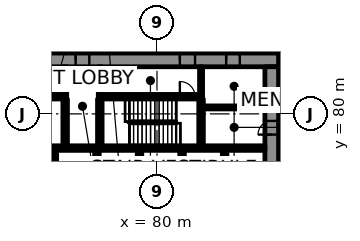
"""IFC4 building model, lengths in metres.
Left out: names, types, materials, properties, quantities, classifications, styles, units other than length and angle.
Written with IfcOpenShell. Run it as: python <this file> out.ifc"""

import sys

from ifc_helpers import new_model, si_unit, direction, frame, frame_2d, origin, place, context, subcontext, project, spatial, rectangle, extrude, element, fill, save


model = new_model("IFC4")
c1 = context("Model", 3, precision=1e-05, world=origin(), true_north=direction((0.0, 1.0)))
c2 = subcontext(c1, "Body", "Model", "MODEL_VIEW")
j1 = project(units=[si_unit("LENGTHUNIT", "METRE"), si_unit("PLANEANGLEUNIT", "RADIAN")], contexts=[c1])
p1 = place(None, origin())
s1 = spatial("IfcSite", under=j1, at=p1, CompositionType="ELEMENT")
p2 = place(p1, origin())
s2 = spatial("IfcBuilding", under=s1, at=p2, CompositionType="ELEMENT")
p3 = place(p2, origin())
s3 = spatial("IfcBuildingStorey", under=s2, at=p3, CompositionType="ELEMENT", Elevation=0.0)
p4 = place(p3, frame((62.0, 83.55, 0.0), z_axis=(0.0, 0.0, 1.0), x_axis=(1.0, 0.0, 0.0)))
e1 = element("IfcWall", 1, at=p4, inside=s3, PredefinedType="SHEAR", context=c2, shape_type="SweptSolid", body=[
    extrude(rectangle(XDim=26.0, YDim=0.9, at=frame_2d((13.0, 0.0))), origin(), (0.0, 0.0, 1.0), 7.7),
])
p5 = place(p4, frame((5.695, 0.0, 0.0)))
e2 = element("IfcOpeningElement", 2, at=p5, cuts=e1, PredefinedType="OPENING", context=c2, shape_type="SweptSolid", body=[
    extrude(rectangle(XDim=1.0, YDim=2.1, at=frame_2d((0.5, 1.05))), frame((0.0, 0.46, 0.0), z_axis=(0.0, -1.0, 0.0), x_axis=(1.0, 0.0, 0.0)), (0.0, 0.0, 1.0), 0.92),
])
p6 = place(p4, frame((19.505, 0.0, 0.0)))
e3 = element("IfcOpeningElement", 3, at=p6, cuts=e1, PredefinedType="OPENING", context=c2, shape_type="SweptSolid", body=[
    extrude(rectangle(XDim=1.0, YDim=2.1, at=frame_2d((0.5, 1.05))), frame((0.0, 0.46, 0.0), z_axis=(0.0, -1.0, 0.0), x_axis=(1.0, 0.0, 0.0)), (0.0, 0.0, 1.0), 0.92),
])
p7 = place(p4, frame((3.45, 0.0, 0.0)))
e4 = element("IfcOpeningElement", 4, at=p7, cuts=e1, PredefinedType="OPENING", context=c2, shape_type="SweptSolid", body=[
    extrude(rectangle(XDim=0.9, YDim=2.1, at=frame_2d((0.45, 1.05))), frame((0.0, 0.46, 0.0), z_axis=(0.0, -1.0, 0.0), x_axis=(1.0, 0.0, 0.0)), (0.0, 0.0, 1.0), 0.92),
])
p8 = place(p4, frame((12.65, 0.0, 0.0)))
e5 = element("IfcOpeningElement", 5, at=p8, cuts=e1, PredefinedType="OPENING", context=c2, shape_type="SweptSolid", body=[
    extrude(rectangle(XDim=0.9, YDim=2.1, at=frame_2d((0.45, 1.05))), frame((0.0, 0.46, 0.0), z_axis=(0.0, -1.0, 0.0), x_axis=(1.0, 0.0, 0.0)), (0.0, 0.0, 1.0), 0.92),
])
p9 = place(p4, frame((22.55, 0.0, 0.0)))
e6 = element("IfcOpeningElement", 6, at=p9, cuts=e1, PredefinedType="OPENING", context=c2, shape_type="SweptSolid", body=[
    extrude(rectangle(XDim=0.9, YDim=2.1, at=frame_2d((0.45, 1.05))), frame((0.0, 0.46, 0.0), z_axis=(0.0, -1.0, 0.0), x_axis=(1.0, 0.0, 0.0)), (0.0, 0.0, 1.0), 0.92),
])
p10 = place(p3, frame((87.55, 66.9, 0.0), z_axis=(0.0, 0.0, 1.0), x_axis=(0.0, 1.0, 0.0)))
e7 = element("IfcWall", 7, at=p10, inside=s3, PredefinedType="SHEAR", context=c2, shape_type="SweptSolid", body=[
    extrude(rectangle(XDim=16.2, YDim=0.9, at=frame_2d((8.1, 0.0))), origin(), (0.0, 0.0, 1.0), 7.7),
])
p11 = place(p10, frame((5.5, 0.0, 0.0)))
e8 = element("IfcOpeningElement", 8, at=p11, cuts=e7, PredefinedType="OPENING", context=c2, shape_type="SweptSolid", body=[
    extrude(rectangle(XDim=1.8, YDim=2.1, at=frame_2d((0.9, 1.05))), frame((0.0, 0.46, 0.0), z_axis=(0.0, -1.0, 0.0), x_axis=(1.0, 0.0, 0.0)), (0.0, 0.0, 1.0), 0.92),
])
p12 = place(p10, frame((11.738, 0.0, 0.0)))
e9 = element("IfcOpeningElement", 9, at=p12, cuts=e7, PredefinedType="OPENING", context=c2, shape_type="SweptSolid", body=[
    extrude(rectangle(XDim=0.9, YDim=2.1, at=frame_2d((0.45, 1.05))), frame((0.0, 0.46, 0.0), z_axis=(0.0, -1.0, 0.0), x_axis=(1.0, 0.0, 0.0)), (0.0, 0.0, 1.0), 0.92),
])
for number, where, z_axis, x_axis in (
    (10, (73.25, 75.0, 0.0), (0.0, 0.0, 1.0), (0.0, 1.0, 0.0)),
    (11, (76.05, 75.0, 0.0), (0.0, 0.0, 1.0), (0.0, 1.0, 0.0)),
    (12, (78.85, 75.0, 0.0), (0.0, 0.0, 1.0), (0.0, 1.0, 0.0)),
    (13, (81.65, 75.0, 0.0), (0.0, 0.0, 1.0), (0.0, 1.0, 0.0)),
    (14, (84.45, 75.0, 0.0), (0.0, 0.0, 1.0), (0.0, 1.0, 0.0)),
):
    element("IfcWall", number, at=place(p3, frame(where, z_axis=z_axis, x_axis=x_axis)), inside=s3, PredefinedType="SHEAR", context=c2, shape_type="SweptSolid", body=[
        extrude(rectangle(XDim=2.6, YDim=0.3, at=frame_2d((1.3, 0.0))), origin(), (0.0, 0.0, 1.0), 7.7),
    ])
p13 = place(p3, frame((64.35, 77.75, 0.0), z_axis=(0.0, 0.0, 1.0), x_axis=(1.0, 0.0, 0.0)))
e15 = element("IfcWall", 15, at=p13, inside=s3, PredefinedType="SHEAR", context=c2, shape_type="SweptSolid", body=[
    extrude(rectangle(XDim=22.75, YDim=0.3, at=frame_2d((11.375, 0.0))), origin(), (0.0, 0.0, 1.0), 7.7),
])
p14 = place(p13, frame((3.345, 0.0, 0.0)))
e16 = element("IfcOpeningElement", 16, at=p14, cuts=e15, PredefinedType="OPENING", context=c2, shape_type="SweptSolid", body=[
    extrude(rectangle(XDim=1.0, YDim=2.1, at=frame_2d((0.5, 1.05))), frame((0.0, 0.16, 0.0), z_axis=(0.0, -1.0, 0.0), x_axis=(1.0, 0.0, 0.0)), (0.0, 0.0, 1.0), 0.32),
])
p15 = place(p3, frame((67.15, 81.13, 0.0), z_axis=(0.0, 0.0, 1.0), x_axis=(1.0, 0.0, 0.0)))
e17 = element("IfcWall", 17, at=p15, inside=s3, PredefinedType="SHEAR", context=c2, shape_type="SweptSolid", body=[
    extrude(rectangle(XDim=6.91, YDim=0.3, at=frame_2d((3.455, 0.0))), origin(), (0.0, 0.0, 1.0), 7.7),
])
p16 = place(p15, frame((0.545, 0.0, 0.0)))
e18 = element("IfcOpeningElement", 18, at=p16, cuts=e17, PredefinedType="OPENING", context=c2, shape_type="SweptSolid", body=[
    extrude(rectangle(XDim=1.0, YDim=2.1, at=frame_2d((0.5, 1.05))), frame((0.0, 0.16, 0.0), z_axis=(0.0, -1.0, 0.0), x_axis=(1.0, 0.0, 0.0)), (0.0, 0.0, 1.0), 0.32),
])
p17 = place(p3, frame((76.14, 81.13, 0.0), z_axis=(0.0, 0.0, 1.0), x_axis=(1.0, 0.0, 0.0)))
e19 = element("IfcWall", 19, at=p17, inside=s3, PredefinedType="SHEAR", context=c2, shape_type="SweptSolid", body=[
    extrude(rectangle(XDim=6.86, YDim=0.3, at=frame_2d((3.43, 0.0))), origin(), (0.0, 0.0, 1.0), 7.7),
])
p18 = place(p17, frame((5.365, 0.0, 0.0)))
e20 = element("IfcOpeningElement", 20, at=p18, cuts=e19, PredefinedType="OPENING", context=c2, shape_type="SweptSolid", body=[
    extrude(rectangle(XDim=1.0, YDim=2.1, at=frame_2d((0.5, 1.05))), frame((0.0, 0.16, 0.0), z_axis=(0.0, -1.0, 0.0), x_axis=(1.0, 0.0, 0.0)), (0.0, 0.0, 1.0), 0.32),
])
for number, where, z_axis, x_axis in (
    (21, (73.96, 77.9, 0.0), (0.0, 0.0, 1.0), (0.0, 1.0, 0.0)),
    (22, (76.24, 77.9, 0.0), (0.0, 0.0, 1.0), (0.0, 1.0, 0.0)),
    (23, (82.9, 77.9, 0.0), (0.0, 0.0, 1.0), (0.0, 1.0, 0.0)),
):
    element("IfcWall", number, at=place(p3, frame(where, z_axis=z_axis, x_axis=x_axis)), inside=s3, PredefinedType="SHEAR", context=c2, shape_type="SweptSolid", body=[
        extrude(rectangle(XDim=3.08, YDim=0.3, at=frame_2d((1.54, 0.0))), origin(), (0.0, 0.0, 1.0), 7.7),
    ])
p19 = place(p3, frame((107.504, 60.451, 0.0), z_axis=(0.0, 0.0, 1.0), x_axis=(-0.500000550228, 0.86602508611, 0.0)))
e24 = element("IfcWall", 24, at=p19, inside=s3, PredefinedType="SOLIDWALL", context=c2, shape_type="SweptSolid", body=[
    extrude(rectangle(XDim=57.704, YDim=0.3, at=frame_2d((28.852, 0.0))), origin(), (0.0, 0.0, 1.0), 7.7),
])
p20 = place(p19, frame((56.104, 0.0, 0.0)))
e25 = element("IfcOpeningElement", 25, at=p20, cuts=e24, PredefinedType="OPENING", context=c2, shape_type="SweptSolid", body=[
    extrude(rectangle(XDim=1.2, YDim=2.4, at=frame_2d((0.6, 1.2))), frame((0.0, 0.16, 0.0), z_axis=(0.0, -1.0, 0.0), x_axis=(1.0, 0.0, 0.0)), (0.0, 0.0, 1.0), 0.32),
])
p21 = place(p19, frame((1.552, 0.0, 0.15)))
e26 = element("IfcOpeningElement", 26, at=p21, cuts=e24, PredefinedType="OPENING", context=c2, shape_type="SweptSolid", body=[
    extrude(rectangle(XDim=2.1, YDim=5.4, at=frame_2d((1.05, 2.7))), frame((0.0, 0.16, 0.0), z_axis=(0.0, -1.0, 0.0), x_axis=(1.0, 0.0, 0.0)), (0.0, 0.0, 1.0), 0.32),
])
p22 = place(p19, frame((4.052, 0.0, 0.15)))
e27 = element("IfcOpeningElement", 27, at=p22, cuts=e24, PredefinedType="OPENING", context=c2, shape_type="SweptSolid", body=[
    extrude(rectangle(XDim=2.1, YDim=5.4, at=frame_2d((1.05, 2.7))), frame((0.0, 0.16, 0.0), z_axis=(0.0, -1.0, 0.0), x_axis=(1.0, 0.0, 0.0)), (0.0, 0.0, 1.0), 0.32),
])
p23 = place(p19, frame((6.552, 0.0, 0.15)))
e28 = element("IfcOpeningElement", 28, at=p23, cuts=e24, PredefinedType="OPENING", context=c2, shape_type="SweptSolid", body=[
    extrude(rectangle(XDim=2.1, YDim=5.4, at=frame_2d((1.05, 2.7))), frame((0.0, 0.16, 0.0), z_axis=(0.0, -1.0, 0.0), x_axis=(1.0, 0.0, 0.0)), (0.0, 0.0, 1.0), 0.32),
])
p24 = place(p19, frame((9.052, 0.0, 0.15)))
e29 = element("IfcOpeningElement", 29, at=p24, cuts=e24, PredefinedType="OPENING", context=c2, shape_type="SweptSolid", body=[
    extrude(rectangle(XDim=2.1, YDim=5.4, at=frame_2d((1.05, 2.7))), frame((0.0, 0.16, 0.0), z_axis=(0.0, -1.0, 0.0), x_axis=(1.0, 0.0, 0.0)), (0.0, 0.0, 1.0), 0.32),
])
p25 = place(p19, frame((11.552, 0.0, 0.15)))
e30 = element("IfcOpeningElement", 30, at=p25, cuts=e24, PredefinedType="OPENING", context=c2, shape_type="SweptSolid", body=[
    extrude(rectangle(XDim=2.1, YDim=5.4, at=frame_2d((1.05, 2.7))), frame((0.0, 0.16, 0.0), z_axis=(0.0, -1.0, 0.0), x_axis=(1.0, 0.0, 0.0)), (0.0, 0.0, 1.0), 0.32),
])
p26 = place(p19, frame((14.052, 0.0, 0.15)))
e31 = element("IfcOpeningElement", 31, at=p26, cuts=e24, PredefinedType="OPENING", context=c2, shape_type="SweptSolid", body=[
    extrude(rectangle(XDim=2.1, YDim=5.4, at=frame_2d((1.05, 2.7))), frame((0.0, 0.16, 0.0), z_axis=(0.0, -1.0, 0.0), x_axis=(1.0, 0.0, 0.0)), (0.0, 0.0, 1.0), 0.32),
])
p27 = place(p19, frame((16.552, 0.0, 0.15)))
e32 = element("IfcOpeningElement", 32, at=p27, cuts=e24, PredefinedType="OPENING", context=c2, shape_type="SweptSolid", body=[
    extrude(rectangle(XDim=2.1, YDim=5.4, at=frame_2d((1.05, 2.7))), frame((0.0, 0.16, 0.0), z_axis=(0.0, -1.0, 0.0), x_axis=(1.0, 0.0, 0.0)), (0.0, 0.0, 1.0), 0.32),
])
p28 = place(p19, frame((19.052, 0.0, 0.15)))
e33 = element("IfcOpeningElement", 33, at=p28, cuts=e24, PredefinedType="OPENING", context=c2, shape_type="SweptSolid", body=[
    extrude(rectangle(XDim=2.1, YDim=5.4, at=frame_2d((1.05, 2.7))), frame((0.0, 0.16, 0.0), z_axis=(0.0, -1.0, 0.0), x_axis=(1.0, 0.0, 0.0)), (0.0, 0.0, 1.0), 0.32),
])
p29 = place(p19, frame((21.552, 0.0, 0.15)))
e34 = element("IfcOpeningElement", 34, at=p29, cuts=e24, PredefinedType="OPENING", context=c2, shape_type="SweptSolid", body=[
    extrude(rectangle(XDim=2.1, YDim=5.4, at=frame_2d((1.05, 2.7))), frame((0.0, 0.16, 0.0), z_axis=(0.0, -1.0, 0.0), x_axis=(1.0, 0.0, 0.0)), (0.0, 0.0, 1.0), 0.32),
])
p30 = place(p19, frame((24.052, 0.0, 0.15)))
e35 = element("IfcOpeningElement", 35, at=p30, cuts=e24, PredefinedType="OPENING", context=c2, shape_type="SweptSolid", body=[
    extrude(rectangle(XDim=2.1, YDim=5.4, at=frame_2d((1.05, 2.7))), frame((0.0, 0.16, 0.0), z_axis=(0.0, -1.0, 0.0), x_axis=(1.0, 0.0, 0.0)), (0.0, 0.0, 1.0), 0.32),
])
p31 = place(p19, frame((26.552, 0.0, 0.15)))
e36 = element("IfcOpeningElement", 36, at=p31, cuts=e24, PredefinedType="OPENING", context=c2, shape_type="SweptSolid", body=[
    extrude(rectangle(XDim=2.1, YDim=5.4, at=frame_2d((1.05, 2.7))), frame((0.0, 0.16, 0.0), z_axis=(0.0, -1.0, 0.0), x_axis=(1.0, 0.0, 0.0)), (0.0, 0.0, 1.0), 0.32),
])
p32 = place(p19, frame((29.052, 0.0, 0.15)))
e37 = element("IfcOpeningElement", 37, at=p32, cuts=e24, PredefinedType="OPENING", context=c2, shape_type="SweptSolid", body=[
    extrude(rectangle(XDim=2.1, YDim=5.4, at=frame_2d((1.05, 2.7))), frame((0.0, 0.16, 0.0), z_axis=(0.0, -1.0, 0.0), x_axis=(1.0, 0.0, 0.0)), (0.0, 0.0, 1.0), 0.32),
])
p33 = place(p19, frame((31.552, 0.0, 0.15)))
e38 = element("IfcOpeningElement", 38, at=p33, cuts=e24, PredefinedType="OPENING", context=c2, shape_type="SweptSolid", body=[
    extrude(rectangle(XDim=2.1, YDim=5.4, at=frame_2d((1.05, 2.7))), frame((0.0, 0.16, 0.0), z_axis=(0.0, -1.0, 0.0), x_axis=(1.0, 0.0, 0.0)), (0.0, 0.0, 1.0), 0.32),
])
p34 = place(p19, frame((34.052, 0.0, 0.15)))
e39 = element("IfcOpeningElement", 39, at=p34, cuts=e24, PredefinedType="OPENING", context=c2, shape_type="SweptSolid", body=[
    extrude(rectangle(XDim=2.1, YDim=5.4, at=frame_2d((1.05, 2.7))), frame((0.0, 0.16, 0.0), z_axis=(0.0, -1.0, 0.0), x_axis=(1.0, 0.0, 0.0)), (0.0, 0.0, 1.0), 0.32),
])
p35 = place(p19, frame((36.552, 0.0, 0.15)))
e40 = element("IfcOpeningElement", 40, at=p35, cuts=e24, PredefinedType="OPENING", context=c2, shape_type="SweptSolid", body=[
    extrude(rectangle(XDim=2.1, YDim=5.4, at=frame_2d((1.05, 2.7))), frame((0.0, 0.16, 0.0), z_axis=(0.0, -1.0, 0.0), x_axis=(1.0, 0.0, 0.0)), (0.0, 0.0, 1.0), 0.32),
])
p36 = place(p19, frame((39.052, 0.0, 0.15)))
e41 = element("IfcOpeningElement", 41, at=p36, cuts=e24, PredefinedType="OPENING", context=c2, shape_type="SweptSolid", body=[
    extrude(rectangle(XDim=2.1, YDim=5.4, at=frame_2d((1.05, 2.7))), frame((0.0, 0.16, 0.0), z_axis=(0.0, -1.0, 0.0), x_axis=(1.0, 0.0, 0.0)), (0.0, 0.0, 1.0), 0.32),
])
p37 = place(p19, frame((41.552, 0.0, 0.15)))
e42 = element("IfcOpeningElement", 42, at=p37, cuts=e24, PredefinedType="OPENING", context=c2, shape_type="SweptSolid", body=[
    extrude(rectangle(XDim=2.1, YDim=5.4, at=frame_2d((1.05, 2.7))), frame((0.0, 0.16, 0.0), z_axis=(0.0, -1.0, 0.0), x_axis=(1.0, 0.0, 0.0)), (0.0, 0.0, 1.0), 0.32),
])
p38 = place(p19, frame((44.052, 0.0, 0.15)))
e43 = element("IfcOpeningElement", 43, at=p38, cuts=e24, PredefinedType="OPENING", context=c2, shape_type="SweptSolid", body=[
    extrude(rectangle(XDim=2.1, YDim=5.4, at=frame_2d((1.05, 2.7))), frame((0.0, 0.16, 0.0), z_axis=(0.0, -1.0, 0.0), x_axis=(1.0, 0.0, 0.0)), (0.0, 0.0, 1.0), 0.32),
])
p39 = place(p19, frame((46.552, 0.0, 0.15)))
e44 = element("IfcOpeningElement", 44, at=p39, cuts=e24, PredefinedType="OPENING", context=c2, shape_type="SweptSolid", body=[
    extrude(rectangle(XDim=2.1, YDim=5.4, at=frame_2d((1.05, 2.7))), frame((0.0, 0.16, 0.0), z_axis=(0.0, -1.0, 0.0), x_axis=(1.0, 0.0, 0.0)), (0.0, 0.0, 1.0), 0.32),
])
p40 = place(p19, frame((49.052, 0.0, 0.15)))
e45 = element("IfcOpeningElement", 45, at=p40, cuts=e24, PredefinedType="OPENING", context=c2, shape_type="SweptSolid", body=[
    extrude(rectangle(XDim=2.1, YDim=5.4, at=frame_2d((1.05, 2.7))), frame((0.0, 0.16, 0.0), z_axis=(0.0, -1.0, 0.0), x_axis=(1.0, 0.0, 0.0)), (0.0, 0.0, 1.0), 0.32),
])
p41 = place(p19, frame((51.552, 0.0, 0.15)))
e46 = element("IfcOpeningElement", 46, at=p41, cuts=e24, PredefinedType="OPENING", context=c2, shape_type="SweptSolid", body=[
    extrude(rectangle(XDim=2.1, YDim=5.4, at=frame_2d((1.05, 2.7))), frame((0.0, 0.16, 0.0), z_axis=(0.0, -1.0, 0.0), x_axis=(1.0, 0.0, 0.0)), (0.0, 0.0, 1.0), 0.32),
])
p42 = place(p3, frame((83.05, 80.425, 0.0), z_axis=(0.0, 0.0, 1.0), x_axis=(1.0, 0.0, 0.0)))
e47 = element("IfcWall", 47, at=p42, inside=s3, PredefinedType="PARTITIONING", context=c2, shape_type="SweptSolid", body=[
    extrude(rectangle(XDim=4.05, YDim=0.2, at=frame_2d((2.025, 0.0))), origin(), (0.0, 0.0, 1.0), 7.7),
])
for number, where, z_axis, x_axis in (
    (48, (73.96, 81.28, 0.0), (0.0, 0.0, 1.0), (0.0, 1.0, 0.0)),
    (49, (76.24, 81.28, 0.0), (0.0, 0.0, 1.0), (0.0, 1.0, 0.0)),
    (50, (82.9, 81.28, 0.0), (0.0, 0.0, 1.0), (0.0, 1.0, 0.0)),
):
    element("IfcWall", number, at=place(p3, frame(where, z_axis=z_axis, x_axis=x_axis)), inside=s3, PredefinedType="PARTITIONING", context=c2, shape_type="SweptSolid", body=[
        extrude(rectangle(XDim=1.82, YDim=0.2, at=frame_2d((0.91, 0.0))), origin(), (0.0, 0.0, 1.0), 7.7),
    ])
p43 = place(p3, frame((107.106, 62.36, 0.0), z_axis=(0.0, 0.0, 1.0), x_axis=(-0.49999992739, 0.866025445706, 0.0)))
e51 = element("IfcWall", 51, at=p43, inside=s3, PredefinedType="SOLIDWALL", context=c2, shape_type="SweptSolid", body=[
    extrude(rectangle(XDim=54.0, YDim=0.4, at=frame_2d((27.0, 0.0))), origin(), (0.0, 0.0, 1.0), 7.64),
])
p44 = place(p3, frame((112.456, 65.794, 0.0), z_axis=(0.0, 0.0, 1.0), x_axis=(-0.499998559706, 0.866026235337, 0.0)))
e52 = element("IfcWall", 52, at=p44, inside=s3, PredefinedType="PARTITIONING", context=c2, shape_type="SweptSolid", body=[
    extrude(rectangle(XDim=53.4, YDim=0.2, at=frame_2d((26.7, 0.0))), origin(), (0.0, 0.0, 1.0), 7.64),
])
p45 = place(p44, frame((12.6, 0.0, 0.0)))
e53 = element("IfcOpeningElement", 53, at=p45, cuts=e52, PredefinedType="OPENING", context=c2, shape_type="SweptSolid", body=[
    extrude(rectangle(XDim=1.8, YDim=2.1, at=frame_2d((0.9, 1.05))), frame((0.0, 0.11, 0.0), z_axis=(0.0, -1.0, 0.0), x_axis=(1.0, 0.0, 0.0)), (0.0, 0.0, 1.0), 0.22),
])
p46 = place(p44, frame((25.8, 0.0, 0.0)))
e54 = element("IfcOpeningElement", 54, at=p46, cuts=e52, PredefinedType="OPENING", context=c2, shape_type="SweptSolid", body=[
    extrude(rectangle(XDim=1.8, YDim=2.1, at=frame_2d((0.9, 1.05))), frame((0.0, 0.11, 0.0), z_axis=(0.0, -1.0, 0.0), x_axis=(1.0, 0.0, 0.0)), (0.0, 0.0, 1.0), 0.22),
])
p47 = place(p44, frame((35.0, 0.0, 0.0)))
e55 = element("IfcOpeningElement", 55, at=p47, cuts=e52, PredefinedType="OPENING", context=c2, shape_type="SweptSolid", body=[
    extrude(rectangle(XDim=1.0, YDim=2.1, at=frame_2d((0.5, 1.05))), frame((0.0, 0.11, 0.0), z_axis=(0.0, -1.0, 0.0), x_axis=(1.0, 0.0, 0.0)), (0.0, 0.0, 1.0), 0.22),
])
p48 = place(p44, frame((45.75, 0.0, 0.0)))
e56 = element("IfcOpeningElement", 56, at=p48, cuts=e52, PredefinedType="OPENING", context=c2, shape_type="SweptSolid", body=[
    extrude(rectangle(XDim=1.8, YDim=2.1, at=frame_2d((0.9, 1.05))), frame((0.0, 0.11, 0.0), z_axis=(0.0, -1.0, 0.0), x_axis=(1.0, 0.0, 0.0)), (0.0, 0.0, 1.0), 0.22),
])
p49 = place(p18, origin())
e57 = element("IfcDoor", 57, at=p49, inside=s3, OperationType="SINGLE_SWING_RIGHT", PredefinedType="DOOR", context=c2, shape_type="SweptSolid", body=[
    extrude(rectangle(XDim=1.0, YDim=2.1, at=frame_2d((0.5, 1.05))), frame((0.0, 0.025, 0.0), z_axis=(0.0, -1.0, 0.0), x_axis=(1.0, 0.0, 0.0)), (0.0, 0.0, 1.0), 0.05),
])
fill(e20, e57)
p50 = place(p6, origin())
e58 = element("IfcDoor", 58, at=p50, inside=s3, OperationType="SINGLE_SWING_LEFT", PredefinedType="DOOR", context=c2, shape_type="SweptSolid", body=[
    extrude(rectangle(XDim=1.0, YDim=2.1, at=frame_2d((0.5, 1.05))), frame((0.0, 0.17, 0.0), z_axis=(0.0, -1.0, 0.0), x_axis=(1.0, 0.0, 0.0)), (0.0, 0.0, 1.0), 0.34),
])
fill(e3, e58)
p51 = place(p8, origin())
e59 = element("IfcDoor", 59, at=p51, inside=s3, OperationType="SINGLE_SWING_LEFT", PredefinedType="DOOR", context=c2, shape_type="SweptSolid", body=[
    extrude(rectangle(XDim=0.9, YDim=2.1, at=frame_2d((0.45, 1.05))), frame((0.0, 0.17, 0.0), z_axis=(0.0, -1.0, 0.0), x_axis=(1.0, 0.0, 0.0)), (0.0, 0.0, 1.0), 0.34),
])
fill(e5, e59)
p52 = place(p12, origin())
e60 = element("IfcDoor", 60, at=p52, inside=s3, OperationType="SINGLE_SWING_RIGHT", PredefinedType="DOOR", context=c2, shape_type="SweptSolid", body=[
    extrude(rectangle(XDim=0.9, YDim=2.1, at=frame_2d((0.45, 1.05))), frame((0.0, 0.17, 0.0), z_axis=(0.0, -1.0, 0.0), x_axis=(1.0, 0.0, 0.0)), (0.0, 0.0, 1.0), 0.34),
])
fill(e9, e60)
p53 = place(p9, origin())
e61 = element("IfcDoor", 61, at=p53, inside=s3, OperationType="SINGLE_SWING_LEFT", PredefinedType="DOOR", context=c2, shape_type="SweptSolid", body=[
    extrude(rectangle(XDim=0.9, YDim=2.1, at=frame_2d((0.45, 1.05))), frame((0.0, 0.17, 0.0), z_axis=(0.0, -1.0, 0.0), x_axis=(1.0, 0.0, 0.0)), (0.0, 0.0, 1.0), 0.34),
])
fill(e6, e61)
save(model, sys.argv[1])
